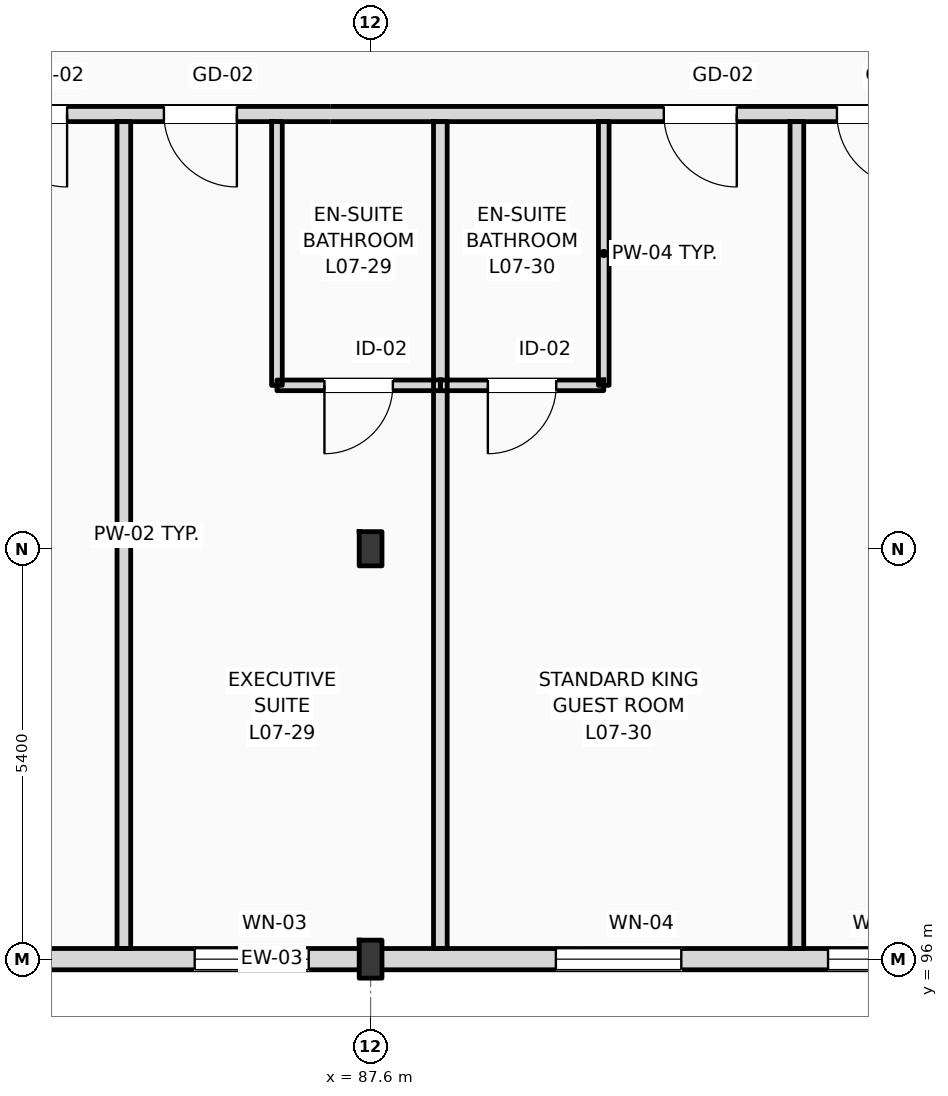
"""IFC4 building model, lengths in metres.
Left out: names, types, materials, properties, quantities, classifications, styles, units other than length and angle.
Written with IfcOpenShell. Run it as: python <this file> out.ifc"""

import sys

from ifc_helpers import new_model, si_unit, direction, frame, frame_2d, origin, origin_2d, place, context, subcontext, project, spatial, rectangle, i_section, extrude, element, fill, save


model = new_model("IFC4")
c1 = context("Model", 3, precision=1e-05, world=origin(), true_north=direction((0.0, 1.0)))
c2 = subcontext(c1, "Body", "Model", "MODEL_VIEW")
j1 = project(units=[si_unit("LENGTHUNIT", "METRE"), si_unit("PLANEANGLEUNIT", "RADIAN")], contexts=[c1])
p1 = place(None, origin())
s1 = spatial("IfcSite", under=j1, at=p1, CompositionType="ELEMENT")
p2 = place(p1, origin())
s2 = spatial("IfcBuilding", under=s1, at=p2, CompositionType="ELEMENT")
p3 = place(p2, frame((0.0, 0.0, 31.8)))
s3 = spatial("IfcBuildingStorey", under=s2, at=p3, CompositionType="ELEMENT", Elevation=31.8)
p4 = place(p3, frame((87.6, 96.0, 0.0), z_axis=(0.0, 0.0, 1.0), x_axis=(1.0, 0.0, 0.0)))
e1 = element("IfcColumn", 1, at=p4, inside=s3, PredefinedType="COLUMN", context=c2, shape_type="SweptSolid", body=[
    extrude(i_section(OverallWidth=0.3, OverallDepth=0.5, WebThickness=0.014, FlangeThickness=0.028, FilletRadius=0.027, at=origin_2d()), origin(), (0.0, 0.0, 1.0), 3.6),
])
p5 = place(p3, frame((87.6, 101.4, 0.0), z_axis=(0.0, 0.0, 1.0), x_axis=(1.0, 0.0, 0.0)))
e2 = element("IfcColumn", 2, at=p5, inside=s3, PredefinedType="COLUMN", context=c2, shape_type="SweptSolid", body=[
    extrude(i_section(OverallWidth=0.3, OverallDepth=0.45, WebThickness=0.014, FlangeThickness=0.026, FilletRadius=0.027, at=origin_2d()), origin(), (0.0, 0.0, 1.0), 3.6),
])
p6 = place(p3, frame((25.2, 96.0, 0.0), z_axis=(0.0, 0.0, 1.0), x_axis=(1.0, 0.0, 0.0)))
e3 = element("IfcWall", 3, at=p6, inside=s3, PredefinedType="STANDARD", context=c2, shape_type="SweptSolid", body=[
    extrude(rectangle(XDim=94.8, YDim=0.28, at=frame_2d((47.4, 0.0))), origin(), (0.0, 0.0, 1.0), 2.72),
])
p7 = place(p6, frame((16.394, 0.0, 0.9)))
e4 = element("IfcOpeningElement", 4, at=p7, cuts=e3, PredefinedType="OPENING", context=c2, shape_type="SweptSolid", body=[
    extrude(rectangle(XDim=2.0, YDim=1.64, at=frame_2d((1.0, 0.82))), frame((0.0, 0.15, 0.0), z_axis=(0.0, -1.0, 0.0), x_axis=(1.0, 0.0, 0.0)), (0.0, 0.0, 1.0), 0.3),
])
p8 = place(p6, frame((20.207, 0.0, 0.9)))
e5 = element("IfcOpeningElement", 5, at=p8, cuts=e3, PredefinedType="OPENING", context=c2, shape_type="SweptSolid", body=[
    extrude(rectangle(XDim=2.3, YDim=1.64, at=frame_2d((1.15, 0.82))), frame((0.0, 0.15, 0.0), z_axis=(0.0, -1.0, 0.0), x_axis=(1.0, 0.0, 0.0)), (0.0, 0.0, 1.0), 0.3),
])
p9 = place(p6, frame((24.287, 0.0, 0.9)))
e6 = element("IfcOpeningElement", 6, at=p9, cuts=e3, PredefinedType="OPENING", context=c2, shape_type="SweptSolid", body=[
    extrude(rectangle(XDim=2.358, YDim=1.64, at=frame_2d((1.179, 0.82))), frame((0.0, 0.15, 0.0), z_axis=(0.0, -1.0, 0.0), x_axis=(1.0, 0.0, 0.0)), (0.0, 0.0, 1.0), 0.3),
])
p10 = place(p6, frame((27.665, 0.0, 0.9)))
e7 = element("IfcOpeningElement", 7, at=p10, cuts=e3, PredefinedType="OPENING", context=c2, shape_type="SweptSolid", body=[
    extrude(rectangle(XDim=1.8, YDim=1.64, at=frame_2d((0.9, 0.82))), frame((0.0, 0.15, 0.0), z_axis=(0.0, -1.0, 0.0), x_axis=(1.0, 0.0, 0.0)), (0.0, 0.0, 1.0), 0.3),
])
p11 = place(p6, frame((32.103, 0.0, 0.9)))
e8 = element("IfcOpeningElement", 8, at=p11, cuts=e3, PredefinedType="OPENING", context=c2, shape_type="SweptSolid", body=[
    extrude(rectangle(XDim=2.359, YDim=1.64, at=frame_2d((1.179, 0.82))), frame((0.0, 0.15, 0.0), z_axis=(0.0, -1.0, 0.0), x_axis=(1.0, 0.0, 0.0)), (0.0, 0.0, 1.0), 0.3),
])
p12 = place(p6, frame((36.336, 0.0, 0.9)))
e9 = element("IfcOpeningElement", 9, at=p12, cuts=e3, PredefinedType="OPENING", context=c2, shape_type="SweptSolid", body=[
    extrude(rectangle(XDim=1.2, YDim=1.64, at=frame_2d((0.6, 0.82))), frame((0.0, 0.15, 0.0), z_axis=(0.0, -1.0, 0.0), x_axis=(1.0, 0.0, 0.0)), (0.0, 0.0, 1.0), 0.3),
])
p13 = place(p6, frame((56.177, 0.0, 0.9)))
e10 = element("IfcOpeningElement", 10, at=p13, cuts=e3, PredefinedType="OPENING", context=c2, shape_type="SweptSolid", body=[
    extrude(rectangle(XDim=1.35, YDim=1.64, at=frame_2d((0.675, 0.82))), frame((0.0, 0.15, 0.0), z_axis=(0.0, -1.0, 0.0), x_axis=(1.0, 0.0, 0.0)), (0.0, 0.0, 1.0), 0.3),
])
p14 = place(p6, frame((60.086, 0.0, 0.9)))
e11 = element("IfcOpeningElement", 11, at=p14, cuts=e3, PredefinedType="OPENING", context=c2, shape_type="SweptSolid", body=[
    extrude(rectangle(XDim=1.5, YDim=1.64, at=frame_2d((0.75, 0.82))), frame((0.0, 0.15, 0.0), z_axis=(0.0, -1.0, 0.0), x_axis=(1.0, 0.0, 0.0)), (0.0, 0.0, 1.0), 0.3),
])
p15 = place(p6, frame((64.838, 0.0, 0.9)))
e12 = element("IfcOpeningElement", 12, at=p15, cuts=e3, PredefinedType="OPENING", context=c2, shape_type="SweptSolid", body=[
    extrude(rectangle(XDim=1.65, YDim=1.64, at=frame_2d((0.825, 0.82))), frame((0.0, 0.15, 0.0), z_axis=(0.0, -1.0, 0.0), x_axis=(1.0, 0.0, 0.0)), (0.0, 0.0, 1.0), 0.3),
])
p16 = place(p6, frame((68.419, 0.0, 0.9)))
e13 = element("IfcOpeningElement", 13, at=p16, cuts=e3, PredefinedType="OPENING", context=c2, shape_type="SweptSolid", body=[
    extrude(rectangle(XDim=0.9, YDim=1.64, at=frame_2d((0.45, 0.82))), frame((0.0, 0.15, 0.0), z_axis=(0.0, -1.0, 0.0), x_axis=(1.0, 0.0, 0.0)), (0.0, 0.0, 1.0), 0.3),
])
p17 = place(p6, frame((73.544, 0.0, 0.9)))
e14 = element("IfcOpeningElement", 14, at=p17, cuts=e3, PredefinedType="OPENING", context=c2, shape_type="SweptSolid", body=[
    extrude(rectangle(XDim=1.95, YDim=1.64, at=frame_2d((0.975, 0.82))), frame((0.0, 0.15, 0.0), z_axis=(0.0, -1.0, 0.0), x_axis=(1.0, 0.0, 0.0)), (0.0, 0.0, 1.0), 0.3),
])
p18 = place(p6, frame((78.897, 0.0, 0.9)))
e15 = element("IfcOpeningElement", 15, at=p18, cuts=e3, PredefinedType="OPENING", context=c2, shape_type="SweptSolid", body=[
    extrude(rectangle(XDim=1.35, YDim=1.64, at=frame_2d((0.675, 0.82))), frame((0.0, 0.15, 0.0), z_axis=(0.0, -1.0, 0.0), x_axis=(1.0, 0.0, 0.0)), (0.0, 0.0, 1.0), 0.3),
])
p19 = place(p6, frame((82.249, 0.0, 0.9)))
e16 = element("IfcOpeningElement", 16, at=p19, cuts=e3, PredefinedType="OPENING", context=c2, shape_type="SweptSolid", body=[
    extrude(rectangle(XDim=2.25, YDim=1.64, at=frame_2d((1.125, 0.82))), frame((0.0, 0.15, 0.0), z_axis=(0.0, -1.0, 0.0), x_axis=(1.0, 0.0, 0.0)), (0.0, 0.0, 1.0), 0.3),
])
p20 = place(p6, frame((87.202, 0.0, 0.9)))
e17 = element("IfcOpeningElement", 17, at=p20, cuts=e3, PredefinedType="OPENING", context=c2, shape_type="SweptSolid", body=[
    extrude(rectangle(XDim=1.8, YDim=1.64, at=frame_2d((0.9, 0.82))), frame((0.0, 0.15, 0.0), z_axis=(0.0, -1.0, 0.0), x_axis=(1.0, 0.0, 0.0)), (0.0, 0.0, 1.0), 0.3),
])
p21 = place(p6, frame((90.867, 0.0, 0.9)))
e18 = element("IfcOpeningElement", 18, at=p21, cuts=e3, PredefinedType="OPENING", context=c2, shape_type="SweptSolid", body=[
    extrude(rectangle(XDim=2.55, YDim=1.64, at=frame_2d((1.275, 0.82))), frame((0.0, 0.15, 0.0), z_axis=(0.0, -1.0, 0.0), x_axis=(1.0, 0.0, 0.0)), (0.0, 0.0, 1.0), 0.3),
])
p22 = place(p3, frame((79.76, 107.12, 0.0), z_axis=(0.0, 0.0, 1.0), x_axis=(1.0, 0.0, 0.0)))
e19 = element("IfcWall", 19, at=p22, inside=s3, PredefinedType="PARTITIONING", context=c2, shape_type="SweptSolid", body=[
    extrude(rectangle(XDim=40.1, YDim=0.2, at=frame_2d((20.05, 0.0))), origin(), (0.0, 0.0, 1.0), 3.36),
])
p23 = place(p22, frame((2.887, 0.0, 0.0)))
e20 = element("IfcOpeningElement", 20, at=p23, cuts=e19, PredefinedType="OPENING", context=c2, shape_type="SweptSolid", body=[
    extrude(rectangle(XDim=0.96, YDim=2.2, at=frame_2d((0.48, 1.1))), frame((0.0, 0.11, 0.0), z_axis=(0.0, -1.0, 0.0), x_axis=(1.0, 0.0, 0.0)), (0.0, 0.0, 1.0), 0.22),
])
p24 = place(p22, frame((5.121, 0.0, 0.0)))
e21 = element("IfcOpeningElement", 21, at=p24, cuts=e19, PredefinedType="OPENING", context=c2, shape_type="SweptSolid", body=[
    extrude(rectangle(XDim=0.96, YDim=2.2, at=frame_2d((0.48, 1.1))), frame((0.0, 0.11, 0.0), z_axis=(0.0, -1.0, 0.0), x_axis=(1.0, 0.0, 0.0)), (0.0, 0.0, 1.0), 0.22),
])
p25 = place(p22, frame((11.698, 0.0, 0.0)))
e22 = element("IfcOpeningElement", 22, at=p25, cuts=e19, PredefinedType="OPENING", context=c2, shape_type="SweptSolid", body=[
    extrude(rectangle(XDim=0.96, YDim=2.2, at=frame_2d((0.48, 1.1))), frame((0.0, 0.11, 0.0), z_axis=(0.0, -1.0, 0.0), x_axis=(1.0, 0.0, 0.0)), (0.0, 0.0, 1.0), 0.22),
])
p26 = place(p22, frame((13.976, 0.0, 0.0)))
e23 = element("IfcOpeningElement", 23, at=p26, cuts=e19, PredefinedType="OPENING", context=c2, shape_type="SweptSolid", body=[
    extrude(rectangle(XDim=0.96, YDim=2.2, at=frame_2d((0.48, 1.1))), frame((0.0, 0.11, 0.0), z_axis=(0.0, -1.0, 0.0), x_axis=(1.0, 0.0, 0.0)), (0.0, 0.0, 1.0), 0.22),
])
p27 = place(p22, frame((20.554, 0.0, 0.0)))
e24 = element("IfcOpeningElement", 24, at=p27, cuts=e19, PredefinedType="OPENING", context=c2, shape_type="SweptSolid", body=[
    extrude(rectangle(XDim=0.96, YDim=2.2, at=frame_2d((0.48, 1.1))), frame((0.0, 0.11, 0.0), z_axis=(0.0, -1.0, 0.0), x_axis=(1.0, 0.0, 0.0)), (0.0, 0.0, 1.0), 0.22),
])
p28 = place(p22, frame((24.982, 0.0, 0.0)))
e25 = element("IfcOpeningElement", 25, at=p28, cuts=e19, PredefinedType="OPENING", context=c2, shape_type="SweptSolid", body=[
    extrude(rectangle(XDim=0.96, YDim=2.2, at=frame_2d((0.48, 1.1))), frame((0.0, 0.11, 0.0), z_axis=(0.0, -1.0, 0.0), x_axis=(1.0, 0.0, 0.0)), (0.0, 0.0, 1.0), 0.22),
])
p29 = place(p22, frame((29.409, 0.0, 0.0)))
e26 = element("IfcOpeningElement", 26, at=p29, cuts=e19, PredefinedType="OPENING", context=c2, shape_type="SweptSolid", body=[
    extrude(rectangle(XDim=0.96, YDim=2.2, at=frame_2d((0.48, 1.1))), frame((0.0, 0.11, 0.0), z_axis=(0.0, -1.0, 0.0), x_axis=(1.0, 0.0, 0.0)), (0.0, 0.0, 1.0), 0.22),
])
p30 = place(p22, frame((33.837, 0.0, 0.0)))
e27 = element("IfcOpeningElement", 27, at=p30, cuts=e19, PredefinedType="OPENING", context=c2, shape_type="SweptSolid", body=[
    extrude(rectangle(XDim=0.96, YDim=2.2, at=frame_2d((0.48, 1.1))), frame((0.0, 0.11, 0.0), z_axis=(0.0, -1.0, 0.0), x_axis=(1.0, 0.0, 0.0)), (0.0, 0.0, 1.0), 0.22),
])
p31 = place(p22, frame((36.027, 0.0, 0.0)))
e28 = element("IfcOpeningElement", 28, at=p31, cuts=e19, PredefinedType="OPENING", context=c2, shape_type="SweptSolid", body=[
    extrude(rectangle(XDim=0.96, YDim=2.2, at=frame_2d((0.48, 1.1))), frame((0.0, 0.11, 0.0), z_axis=(0.0, -1.0, 0.0), x_axis=(1.0, 0.0, 0.0)), (0.0, 0.0, 1.0), 0.22),
])
for number, where, z_axis, x_axis in (
    (29, (84.354, 96.14, 0.0), (0.0, 0.0, 1.0), (0.0, 1.0, 0.0)),
    (30, (88.518, 96.14, 0.0), (0.0, 0.0, 1.0), (0.0, 1.0, 0.0)),
):
    element("IfcWall", number, at=place(p3, frame(where, z_axis=z_axis, x_axis=x_axis)), inside=s3, PredefinedType="PARTITIONING", context=c2, shape_type="SweptSolid", body=[
        extrude(rectangle(XDim=10.88, YDim=0.18, at=frame_2d((5.44, 0.0))), origin(), (0.0, 0.0, 1.0), 3.36),
    ])
p32 = place(p3, frame((86.368, 103.55, 0.0), z_axis=(0.0, 0.0, 1.0), x_axis=(0.0, 1.0, 0.0)))
e31 = element("IfcWall", 31, at=p32, inside=s3, PredefinedType="PARTITIONING", context=c2, shape_type="SweptSolid", body=[
    extrude(rectangle(XDim=3.47, YDim=0.14, at=frame_2d((1.735, 0.0))), origin(), (0.0, 0.0, 1.0), 3.36),
])
p33 = place(p3, frame((86.368, 103.55, 0.0), z_axis=(0.0, 0.0, 1.0), x_axis=(1.0, 0.0, 0.0)))
e32 = element("IfcWall", 32, at=p33, inside=s3, PredefinedType="PARTITIONING", context=c2, shape_type="SweptSolid", body=[
    extrude(rectangle(XDim=2.15, YDim=0.14, at=frame_2d((1.075, 0.0))), origin(), (0.0, 0.0, 1.0), 3.36),
])
p34 = place(p33, frame((0.625, 0.0, 0.0)))
e33 = element("IfcOpeningElement", 33, at=p34, cuts=e32, PredefinedType="OPENING", context=c2, shape_type="SweptSolid", body=[
    extrude(rectangle(XDim=0.9, YDim=2.1, at=frame_2d((0.45, 1.05))), frame((0.0, 0.08, 0.0), z_axis=(0.0, -1.0, 0.0), x_axis=(1.0, 0.0, 0.0)), (0.0, 0.0, 1.0), 0.16),
])
p35 = place(p3, frame((93.209, 96.14, 0.0), z_axis=(0.0, 0.0, 1.0), x_axis=(0.0, 1.0, 0.0)))
e34 = element("IfcWall", 34, at=p35, inside=s3, PredefinedType="PARTITIONING", context=c2, shape_type="SweptSolid", body=[
    extrude(rectangle(XDim=10.88, YDim=0.18, at=frame_2d((5.44, 0.0))), origin(), (0.0, 0.0, 1.0), 3.36),
])
p36 = place(p3, frame((90.668, 103.55, 0.0), z_axis=(0.0, 0.0, 1.0), x_axis=(0.0, 1.0, 0.0)))
e35 = element("IfcWall", 35, at=p36, inside=s3, PredefinedType="PARTITIONING", context=c2, shape_type="SweptSolid", body=[
    extrude(rectangle(XDim=3.47, YDim=0.14, at=frame_2d((1.735, 0.0))), origin(), (0.0, 0.0, 1.0), 3.36),
])
p37 = place(p3, frame((88.518, 103.55, 0.0), z_axis=(0.0, 0.0, 1.0), x_axis=(1.0, 0.0, 0.0)))
e36 = element("IfcWall", 36, at=p37, inside=s3, PredefinedType="PARTITIONING", context=c2, shape_type="SweptSolid", body=[
    extrude(rectangle(XDim=2.15, YDim=0.14, at=frame_2d((1.075, 0.0))), origin(), (0.0, 0.0, 1.0), 3.36),
])
p38 = place(p37, frame((0.625, 0.0, 0.0)))
e37 = element("IfcOpeningElement", 37, at=p38, cuts=e36, PredefinedType="OPENING", context=c2, shape_type="SweptSolid", body=[
    extrude(rectangle(XDim=0.9, YDim=2.1, at=frame_2d((0.45, 1.05))), frame((0.0, 0.08, 0.0), z_axis=(0.0, -1.0, 0.0), x_axis=(1.0, 0.0, 0.0)), (0.0, 0.0, 1.0), 0.16),
])
p39 = place(p14, origin())
e38 = element("IfcWindow", 38, at=p39, inside=s3, PartitioningType="DOUBLE_PANEL_VERTICAL", PredefinedType="WINDOW", context=c2, shape_type="SweptSolid", body=[
    extrude(rectangle(XDim=1.5, YDim=1.64, at=frame_2d((0.75, 0.82))), frame((0.0, 0.03, 0.0), z_axis=(0.0, -1.0, 0.0), x_axis=(1.0, 0.0, 0.0)), (0.0, 0.0, 1.0), 0.06),
])
fill(e11, e38)
p40 = place(p15, origin())
e39 = element("IfcWindow", 39, at=p40, inside=s3, PartitioningType="DOUBLE_PANEL_VERTICAL", PredefinedType="WINDOW", context=c2, shape_type="SweptSolid", body=[
    extrude(rectangle(XDim=1.65, YDim=1.64, at=frame_2d((0.825, 0.82))), frame((0.0, 0.03, 0.0), z_axis=(0.0, -1.0, 0.0), x_axis=(1.0, 0.0, 0.0)), (0.0, 0.0, 1.0), 0.06),
])
fill(e12, e39)
p41 = place(p16, origin())
e40 = element("IfcWindow", 40, at=p41, inside=s3, PartitioningType="DOUBLE_PANEL_VERTICAL", PredefinedType="WINDOW", context=c2, shape_type="SweptSolid", body=[
    extrude(rectangle(XDim=0.9, YDim=1.64, at=frame_2d((0.45, 0.82))), frame((0.0, 0.03, 0.0), z_axis=(0.0, -1.0, 0.0), x_axis=(1.0, 0.0, 0.0)), (0.0, 0.0, 1.0), 0.06),
])
fill(e13, e40)
p42 = place(p23, frame((0.96, 0.0, 0.0), z_axis=(0.0, 0.0, 1.0), x_axis=(-1.0, 0.0, 0.0)))
e41 = element("IfcDoor", 41, at=p42, inside=s3, OperationType="SINGLE_SWING_RIGHT", PredefinedType="DOOR", context=c2, shape_type="SweptSolid", body=[
    extrude(rectangle(XDim=0.96, YDim=2.2, at=frame_2d((0.48, 1.1))), frame((0.0, 0.025, 0.0), z_axis=(0.0, -1.0, 0.0), x_axis=(1.0, 0.0, 0.0)), (0.0, 0.0, 1.0), 0.05),
])
fill(e20, e41)
p43 = place(p24, frame((0.96, 0.0, 0.0), z_axis=(0.0, 0.0, 1.0), x_axis=(-1.0, 0.0, 0.0)))
e42 = element("IfcDoor", 42, at=p43, inside=s3, OperationType="SINGLE_SWING_RIGHT", PredefinedType="DOOR", context=c2, shape_type="SweptSolid", body=[
    extrude(rectangle(XDim=0.96, YDim=2.2, at=frame_2d((0.48, 1.1))), frame((0.0, 0.025, 0.0), z_axis=(0.0, -1.0, 0.0), x_axis=(1.0, 0.0, 0.0)), (0.0, 0.0, 1.0), 0.05),
])
fill(e21, e42)
p44 = place(p34, frame((0.9, 0.0, 0.0), z_axis=(0.0, 0.0, 1.0), x_axis=(-1.0, 0.0, 0.0)))
e43 = element("IfcDoor", 43, at=p44, inside=s3, OperationType="SINGLE_SWING_LEFT", PredefinedType="DOOR", context=c2, shape_type="SweptSolid", body=[
    extrude(rectangle(XDim=0.9, YDim=2.1, at=frame_2d((0.45, 1.05))), frame((0.0, 0.025, 0.0), z_axis=(0.0, -1.0, 0.0), x_axis=(1.0, 0.0, 0.0)), (0.0, 0.0, 1.0), 0.05),
])
fill(e33, e43)
p45 = place(p25, frame((0.96, 0.0, 0.0), z_axis=(0.0, 0.0, 1.0), x_axis=(-1.0, 0.0, 0.0)))
e44 = element("IfcDoor", 44, at=p45, inside=s3, OperationType="SINGLE_SWING_RIGHT", PredefinedType="DOOR", context=c2, shape_type="SweptSolid", body=[
    extrude(rectangle(XDim=0.96, YDim=2.2, at=frame_2d((0.48, 1.1))), frame((0.0, 0.025, 0.0), z_axis=(0.0, -1.0, 0.0), x_axis=(1.0, 0.0, 0.0)), (0.0, 0.0, 1.0), 0.05),
])
fill(e22, e44)
p46 = place(p38, frame((0.9, 0.0, 0.0), z_axis=(0.0, 0.0, 1.0), x_axis=(-1.0, 0.0, 0.0)))
e45 = element("IfcDoor", 45, at=p46, inside=s3, OperationType="SINGLE_SWING_LEFT", PredefinedType="DOOR", context=c2, shape_type="SweptSolid", body=[
    extrude(rectangle(XDim=0.9, YDim=2.1, at=frame_2d((0.45, 1.05))), frame((0.0, 0.025, 0.0), z_axis=(0.0, -1.0, 0.0), x_axis=(1.0, 0.0, 0.0)), (0.0, 0.0, 1.0), 0.05),
])
fill(e37, e45)
p47 = place(p26, frame((0.96, 0.0, 0.0), z_axis=(0.0, 0.0, 1.0), x_axis=(-1.0, 0.0, 0.0)))
e46 = element("IfcDoor", 46, at=p47, inside=s3, OperationType="SINGLE_SWING_RIGHT", PredefinedType="DOOR", context=c2, shape_type="SweptSolid", body=[
    extrude(rectangle(XDim=0.96, YDim=2.2, at=frame_2d((0.48, 1.1))), frame((0.0, 0.025, 0.0), z_axis=(0.0, -1.0, 0.0), x_axis=(1.0, 0.0, 0.0)), (0.0, 0.0, 1.0), 0.05),
])
fill(e23, e46)
save(model, sys.argv[1])
